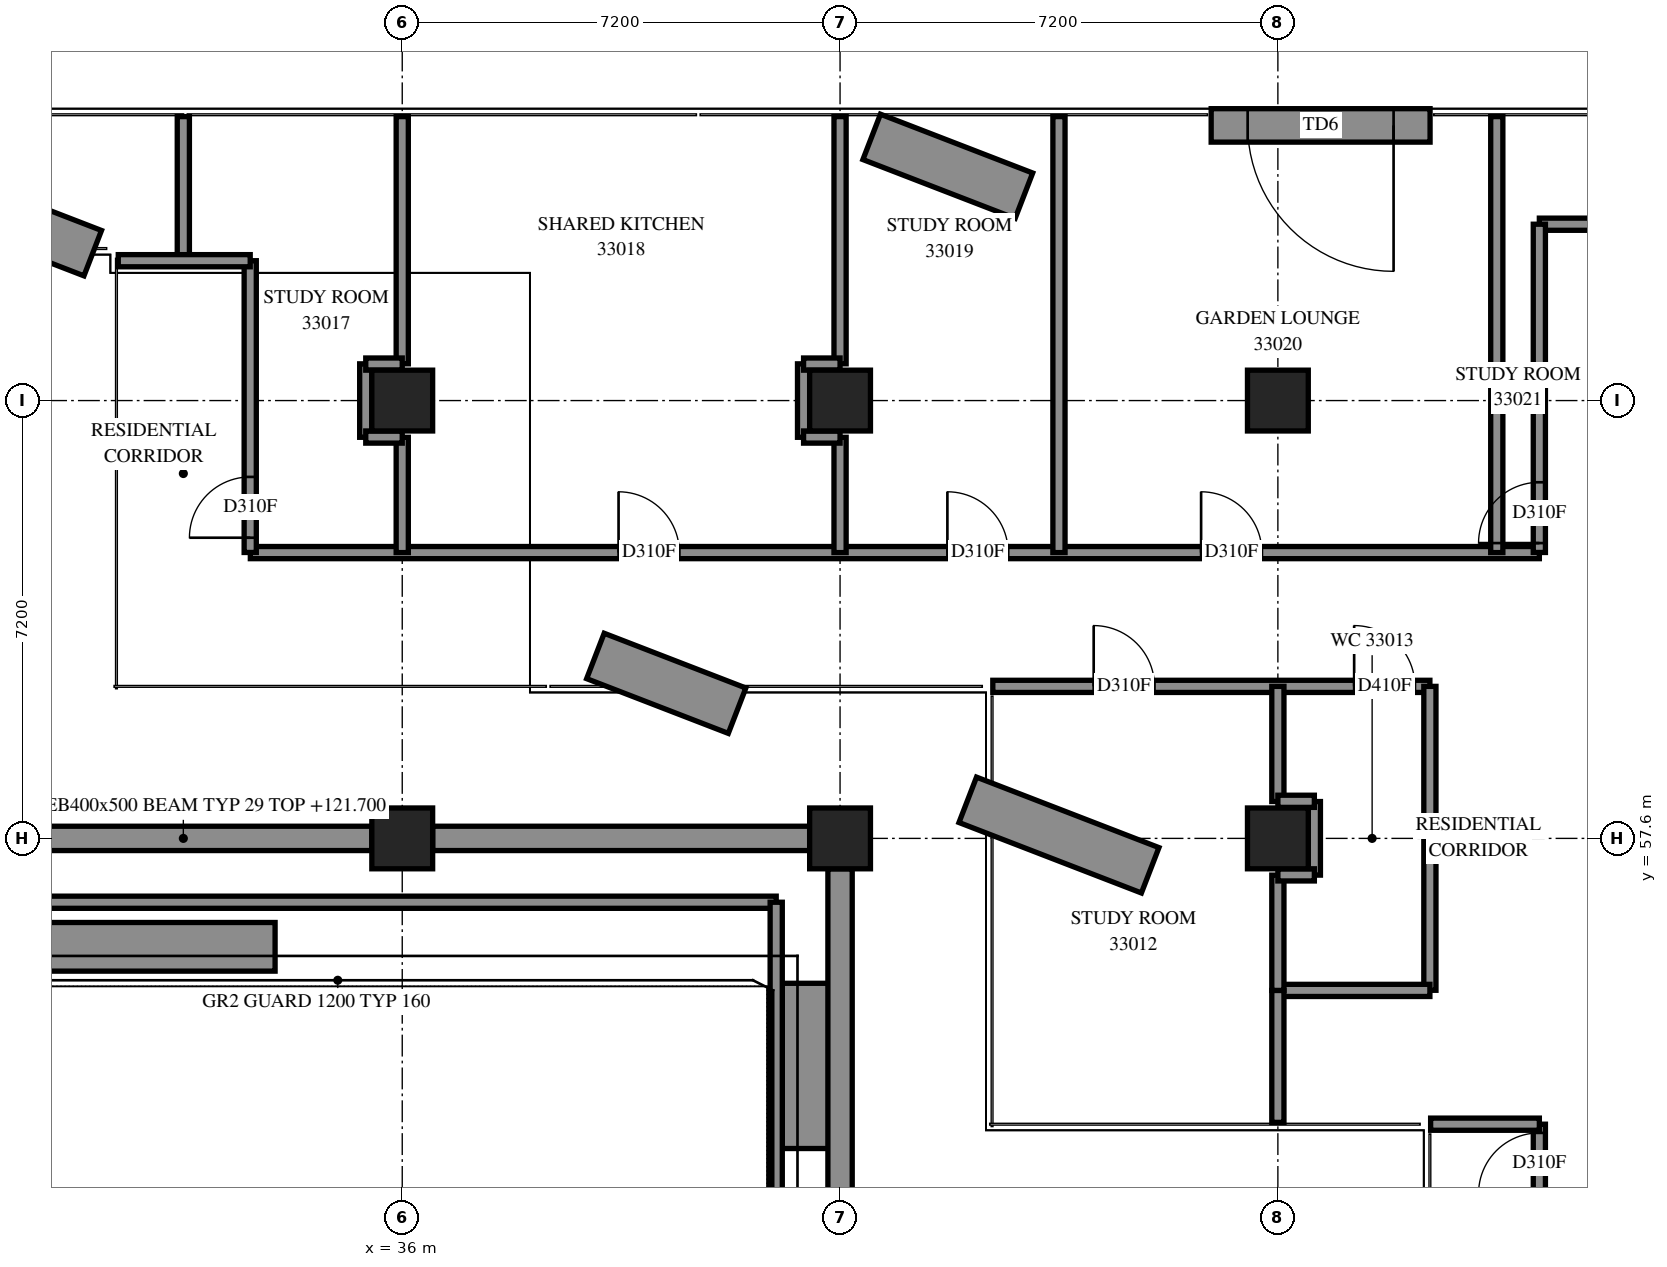
"""IFC4 building model, lengths in metres.
Left out: names, types, materials, properties, quantities, classifications, styles, units other than length and angle.
Written with IfcOpenShell. Run it as: python <this file> out.ifc"""

import sys

from ifc_helpers import new_model, si_unit, direction, frame, frame_2d, origin, origin_2d, place, context, subcontext, project, spatial, polyline, rectangle, outline, extrude, element, fill, save


model = new_model("IFC4")
c1 = context("Model", 3, precision=1e-05, world=origin(), true_north=direction((0.0, 1.0)))
c2 = subcontext(c1, "Body", "Model", "MODEL_VIEW")
j1 = project(units=[si_unit("LENGTHUNIT", "METRE"), si_unit("PLANEANGLEUNIT", "RADIAN")], contexts=[c1])
p1 = place(None, origin())
s1 = spatial("IfcSite", under=j1, at=p1, CompositionType="ELEMENT")
p2 = place(p1, origin())
s2 = spatial("IfcBuilding", under=s1, at=p2, CompositionType="ELEMENT")
p3 = place(p2, frame((0.0, 0.0, 122.0)))
s3 = spatial("IfcBuildingStorey", under=s2, at=p3, CompositionType="ELEMENT", Elevation=122.0)
for number, where, z_axis, x_axis in (
    (1, (36.0, 57.6, 0.0), (0.0, 0.0, 1.0), (1.0, 0.0, 0.0)),
    (2, (36.0, 64.8, 0.0), (0.0, 0.0, 1.0), (1.0, 0.0, 0.0)),
    (3, (43.2, 57.6, 0.0), (0.0, 0.0, 1.0), (1.0, 0.0, 0.0)),
    (4, (43.2, 64.8, 0.0), (0.0, 0.0, 1.0), (1.0, 0.0, 0.0)),
    (5, (50.4, 57.6, 0.0), (0.0, 0.0, 1.0), (1.0, 0.0, 0.0)),
    (6, (50.4, 64.8, 0.0), (0.0, 0.0, 1.0), (1.0, 0.0, 0.0)),
):
    element("IfcColumn", number, at=place(p3, frame(where, z_axis=z_axis, x_axis=x_axis)), inside=s3, PredefinedType="COLUMN", context=c2, shape_type="SweptSolid", body=[
        extrude(rectangle(XDim=1.0, YDim=1.0, at=origin_2d()), origin(), (0.0, 0.0, 1.0), 3.9),
    ])
p4 = place(p3, frame((52.903, 69.325, 0.0), z_axis=(0.0, 0.0, 1.0), x_axis=(-1.0, 0.0, 0.0)))
e7 = element("IfcWall", 7, at=p4, inside=s3, PredefinedType="SOLIDWALL", context=c2, shape_type="SweptSolid", body=[
    extrude(rectangle(XDim=3.6, YDim=0.55, at=frame_2d((1.8, 0.0))), origin(), (0.0, 0.0, 1.0), 3.9),
])
p5 = place(p4, frame((0.6, 0.0, 0.0)))
e8 = element("IfcOpeningElement", 8, at=p5, cuts=e7, PredefinedType="OPENING", context=c2, shape_type="SweptSolid", body=[
    extrude(rectangle(XDim=2.4, YDim=2.4, at=frame_2d((1.2, 1.2))), frame((0.0, 0.285, 0.0), z_axis=(0.0, -1.0, 0.0), x_axis=(1.0, 0.0, 0.0)), (0.0, 0.0, 1.0), 0.57),
])
p6 = place(p3, frame((28.85, 55.817, 0.0), z_axis=(0.0, 0.0, 1.0), x_axis=(1.0, 0.0, 0.0)))
e9 = element("IfcWall", 9, at=p6, inside=s3, PredefinedType="SOLIDWALL", context=c2, shape_type="SweptSolid", body=[
    extrude(rectangle(XDim=5.059, YDim=0.8, at=frame_2d((2.53, 0.0))), origin(), (0.0, 0.0, 1.0), 0.65),
])
p7 = place(p3, frame((42.65, 55.217, 0.0), z_axis=(0.0, 0.0, 1.0), x_axis=(0.0, -1.0, 0.0)))
e10 = element("IfcWall", 10, at=p7, inside=s3, PredefinedType="SOLIDWALL", context=c2, shape_type="SweptSolid", body=[
    extrude(rectangle(XDim=2.717, YDim=0.8, at=frame_2d((1.359, 0.0))), origin(), (0.0, 0.0, 1.0), 0.65),
])
p8 = place(p3, frame((46.224, 68.169, 0.0), z_axis=(0.0, 0.0, 1.0), x_axis=(-0.9328058207, 0.3603793848, 0.0)))
e11 = element("IfcWall", 11, at=p8, inside=s3, PredefinedType="SOLIDWALL", context=c2, shape_type="SweptSolid", body=[
    extrude(rectangle(XDim=2.684, YDim=0.8, at=frame_2d((1.342, 0.0))), origin(), (0.0, 0.0, 1.0), 0.65),
])
p9 = place(p3, frame((30.91, 67.224, 0.0), z_axis=(0.0, 0.0, 1.0), x_axis=(-0.9328062354, 0.3603783111, 0.0)))
e12 = element("IfcWall", 12, at=p9, inside=s3, PredefinedType="SOLIDWALL", context=c2, shape_type="SweptSolid", body=[
    extrude(rectangle(XDim=7.828, YDim=0.8, at=frame_2d((3.914, 0.0))), origin(), (0.0, 0.0, 1.0), 0.65),
])
p10 = place(p3, frame((48.3, 57.075, 0.0), z_axis=(0.0, 0.0, 1.0), x_axis=(-0.932818089, 0.3603476278, 0.0)))
e13 = element("IfcWall", 13, at=p10, inside=s3, PredefinedType="SOLIDWALL", context=c2, shape_type="SweptSolid", body=[
    extrude(rectangle(XDim=3.216, YDim=0.8, at=frame_2d((1.608, 0.0))), origin(), (0.0, 0.0, 1.0), 0.65),
])
p11 = place(p3, frame((27.75, 56.55, 0.0), z_axis=(0.0, 0.0, 1.0), x_axis=(1.0, 0.0, 0.0)))
e14 = element("IfcWall", 14, at=p11, inside=s3, PredefinedType="SOLIDWALL", context=c2, shape_type="SweptSolid", body=[
    extrude(outline(polyline([(-0.1, -0.1), (14.3, -0.1), (14.5, 0.1), (0.1, 0.1), (-0.1, -0.1)])), origin(), (0.0, 0.0, 1.0), 4.2),
])
p12 = place(p3, frame((42.15, 56.55, 0.0), z_axis=(0.0, 0.0, 1.0), x_axis=(0.0, -1.0, 0.0)))
e15 = element("IfcWall", 15, at=p12, inside=s3, PredefinedType="SOLIDWALL", context=c2, shape_type="SweptSolid", body=[
    extrude(outline(polyline([(0.1, -0.1), (7.3, -0.1), (7.1, 0.1), (-0.1, 0.1), (0.1, -0.1)])), origin(), (0.0, 0.0, 1.0), 4.2),
])
p13 = place(p3, frame((33.502, 62.3, 0.0), z_axis=(0.0, 0.0, 1.0), x_axis=(1.0, 0.0, 0.0)))
e16 = element("IfcWall", 16, at=p13, inside=s3, PredefinedType="PARTITIONING", context=c2, shape_type="SweptSolid", body=[
    extrude(rectangle(XDim=21.198, YDim=0.2, at=frame_2d((10.599, 0.0))), origin(), (0.0, 0.0, 1.0), 3.9),
])
p14 = place(p13, frame((6.056, 0.0, 0.0)))
e17 = element("IfcOpeningElement", 17, at=p14, cuts=e16, PredefinedType="OPENING", context=c2, shape_type="SweptSolid", body=[
    extrude(rectangle(XDim=1.0, YDim=2.1, at=frame_2d((0.5, 1.05))), frame((0.0, 0.11, 0.0), z_axis=(0.0, -1.0, 0.0), x_axis=(1.0, 0.0, 0.0)), (0.0, 0.0, 1.0), 0.22),
])
p15 = place(p13, frame((11.463, 0.0, 0.0)))
e18 = element("IfcOpeningElement", 18, at=p15, cuts=e16, PredefinedType="OPENING", context=c2, shape_type="SweptSolid", body=[
    extrude(rectangle(XDim=1.0, YDim=2.1, at=frame_2d((0.5, 1.05))), frame((0.0, 0.11, 0.0), z_axis=(0.0, -1.0, 0.0), x_axis=(1.0, 0.0, 0.0)), (0.0, 0.0, 1.0), 0.22),
])
p16 = place(p13, frame((15.636, 0.0, 0.0)))
e19 = element("IfcOpeningElement", 19, at=p16, cuts=e16, PredefinedType="OPENING", context=c2, shape_type="SweptSolid", body=[
    extrude(rectangle(XDim=1.0, YDim=2.1, at=frame_2d((0.5, 1.05))), frame((0.0, 0.11, 0.0), z_axis=(0.0, -1.0, 0.0), x_axis=(1.0, 0.0, 0.0)), (0.0, 0.0, 1.0), 0.22),
])
p17 = place(p3, frame((54.7, 67.7, 0.0), z_axis=(0.0, 0.0, 1.0), x_axis=(1.0, 0.0, 0.0)))
e20 = element("IfcWall", 20, at=p17, inside=s3, PredefinedType="PARTITIONING", context=c2, shape_type="SweptSolid", body=[
    extrude(rectangle(XDim=20.2, YDim=0.2, at=frame_2d((10.1, 0.0))), origin(), (0.0, 0.0, 1.0), 3.9),
])
p18 = place(p17, frame((8.838, 0.0, 0.0)))
e21 = element("IfcOpeningElement", 21, at=p18, cuts=e20, PredefinedType="OPENING", context=c2, shape_type="SweptSolid", body=[
    extrude(rectangle(XDim=1.0, YDim=2.1, at=frame_2d((0.5, 1.05))), frame((0.0, 0.11, 0.0), z_axis=(0.0, -1.0, 0.0), x_axis=(1.0, 0.0, 0.0)), (0.0, 0.0, 1.0), 0.22),
])
p19 = place(p3, frame((45.712, 60.1, 0.0), z_axis=(0.0, 0.0, 1.0), x_axis=(1.0, 0.0, 0.0)))
e22 = element("IfcWall", 22, at=p19, inside=s3, PredefinedType="PARTITIONING", context=c2, shape_type="SweptSolid", body=[
    extrude(rectangle(XDim=7.188, YDim=0.2, at=frame_2d((3.594, 0.0))), origin(), (0.0, 0.0, 1.0), 3.9),
])
p20 = place(p19, frame((1.659, 0.0, 0.0)))
e23 = element("IfcOpeningElement", 23, at=p20, cuts=e22, PredefinedType="OPENING", context=c2, shape_type="SweptSolid", body=[
    extrude(rectangle(XDim=1.0, YDim=2.1, at=frame_2d((0.5, 1.05))), frame((0.0, 0.11, 0.0), z_axis=(0.0, -1.0, 0.0), x_axis=(1.0, 0.0, 0.0)), (0.0, 0.0, 1.0), 0.22),
])
p21 = place(p19, frame((5.942, 0.0, 0.0)))
e24 = element("IfcOpeningElement", 24, at=p21, cuts=e22, PredefinedType="OPENING", context=c2, shape_type="SweptSolid", body=[
    extrude(rectangle(XDim=1.0, YDim=2.1, at=frame_2d((0.5, 1.05))), frame((0.0, 0.11, 0.0), z_axis=(0.0, -1.0, 0.0), x_axis=(1.0, 0.0, 0.0)), (0.0, 0.0, 1.0), 0.22),
])
for number, where, z_axis, x_axis in (
    (25, (46.8, 62.3, 0.0), (0.0, 0.0, 1.0), (0.0, 1.0, 0.0)),
    (26, (54.0, 62.3, 0.0), (0.0, 0.0, 1.0), (0.0, 1.0, 0.0)),
):
    element("IfcWall", number, at=place(p3, frame(where, z_axis=z_axis, x_axis=x_axis)), inside=s3, PredefinedType="PARTITIONING", context=c2, shape_type="SweptSolid", body=[
        extrude(rectangle(XDim=7.17, YDim=0.2, at=frame_2d((3.585, 0.0))), origin(), (0.0, 0.0, 1.0), 3.9),
    ])
p22 = place(p3, frame((54.7, 47.5, 0.0), z_axis=(0.0, 0.0, 1.0), x_axis=(0.0, 1.0, 0.0)))
e27 = element("IfcWall", 27, at=p22, inside=s3, PredefinedType="PARTITIONING", context=c2, shape_type="SweptSolid", body=[
    extrude(rectangle(XDim=5.4, YDim=0.2, at=frame_2d((2.7, 0.0))), origin(), (0.0, 0.0, 1.0), 3.9),
])
p23 = place(p22, frame((4.257, 0.0, 0.0)))
e28 = element("IfcOpeningElement", 28, at=p23, cuts=e27, PredefinedType="OPENING", context=c2, shape_type="SweptSolid", body=[
    extrude(rectangle(XDim=1.0, YDim=2.1, at=frame_2d((0.5, 1.05))), frame((0.0, 0.11, 0.0), z_axis=(0.0, -1.0, 0.0), x_axis=(1.0, 0.0, 0.0)), (0.0, 0.0, 1.0), 0.22),
])
p24 = place(p3, frame((54.7, 62.302, 0.0), z_axis=(0.0, 0.0, 1.0), x_axis=(0.0, 1.0, 0.0)))
e29 = element("IfcWall", 29, at=p24, inside=s3, PredefinedType="PARTITIONING", context=c2, shape_type="SweptSolid", body=[
    extrude(rectangle(XDim=5.398, YDim=0.2, at=frame_2d((2.699, 0.0))), origin(), (0.0, 0.0, 1.0), 3.9),
])
p25 = place(p24, frame((0.154, 0.0, 0.0)))
e30 = element("IfcOpeningElement", 30, at=p25, cuts=e29, PredefinedType="OPENING", context=c2, shape_type="SweptSolid", body=[
    extrude(rectangle(XDim=1.0, YDim=2.1, at=frame_2d((0.5, 1.05))), frame((0.0, 0.11, 0.0), z_axis=(0.0, -1.0, 0.0), x_axis=(1.0, 0.0, 0.0)), (0.0, 0.0, 1.0), 0.22),
])
p26 = place(p3, frame((52.9, 55.102, 0.0), z_axis=(0.0, 0.0, 1.0), x_axis=(0.0, 1.0, 0.0)))
e31 = element("IfcWall", 31, at=p26, inside=s3, PredefinedType="PARTITIONING", context=c2, shape_type="SweptSolid", body=[
    extrude(rectangle(XDim=4.998, YDim=0.2, at=frame_2d((2.499, 0.0))), origin(), (0.0, 0.0, 1.0), 3.9),
])
p27 = place(p3, frame((33.5, 62.302, 0.0), z_axis=(0.0, 0.0, 1.0), x_axis=(0.0, 1.0, 0.0)))
e32 = element("IfcWall", 32, at=p27, inside=s3, PredefinedType="PARTITIONING", context=c2, shape_type="SweptSolid", body=[
    extrude(rectangle(XDim=4.798, YDim=0.2, at=frame_2d((2.399, 0.0))), origin(), (0.0, 0.0, 1.0), 3.9),
])
p28 = place(p27, frame((0.242, 0.0, 0.0)))
e33 = element("IfcOpeningElement", 33, at=p28, cuts=e32, PredefinedType="OPENING", context=c2, shape_type="SweptSolid", body=[
    extrude(rectangle(XDim=1.0, YDim=2.1, at=frame_2d((0.5, 1.05))), frame((0.0, 0.11, 0.0), z_axis=(0.0, -1.0, 0.0), x_axis=(1.0, 0.0, 0.0)), (0.0, 0.0, 1.0), 0.22),
])
for number, where, z_axis, x_axis in (
    (34, (36.0, 65.404, 0.0), (0.0, 0.0, 1.0), (0.0, 1.0, 0.0)),
    (35, (43.2, 65.404, 0.0), (0.0, 0.0, 1.0), (0.0, 1.0, 0.0)),
):
    element("IfcWall", number, at=place(p3, frame(where, z_axis=z_axis, x_axis=x_axis)), inside=s3, PredefinedType="PARTITIONING", context=c2, shape_type="SweptSolid", body=[
        extrude(rectangle(XDim=4.066, YDim=0.2, at=frame_2d((2.033, 0.0))), origin(), (0.0, 0.0, 1.0), 3.9),
    ])
p29 = place(p3, frame((50.4, 55.1, 0.0), z_axis=(0.0, 0.0, 1.0), x_axis=(1.0, 0.0, 0.0)))
e36 = element("IfcWall", 36, at=p29, inside=s3, PredefinedType="PARTITIONING", context=c2, shape_type="SweptSolid", body=[
    extrude(rectangle(XDim=2.5, YDim=0.2, at=frame_2d((1.25, 0.0))), origin(), (0.0, 0.0, 1.0), 3.9),
])
p30 = place(p3, frame((32.4, 67.1, 0.0), z_axis=(0.0, 0.0, 1.0), x_axis=(0.0, 1.0, 0.0)))
e37 = element("IfcWall", 37, at=p30, inside=s3, PredefinedType="PARTITIONING", context=c2, shape_type="SweptSolid", body=[
    extrude(rectangle(XDim=2.37, YDim=0.2, at=frame_2d((1.185, 0.0))), origin(), (0.0, 0.0, 1.0), 3.9),
])
for number, where, z_axis, x_axis in (
    (38, (31.33, 67.1, 0.0), (0.0, 0.0, 1.0), (1.0, 0.0, 0.0)),
    (39, (50.4, 52.93, 0.0), (0.0, 0.0, 1.0), (0.0, 1.0, 0.0)),
):
    element("IfcWall", number, at=place(p3, frame(where, z_axis=z_axis, x_axis=x_axis)), inside=s3, PredefinedType="PARTITIONING", context=c2, shape_type="SweptSolid", body=[
        extrude(rectangle(XDim=2.17, YDim=0.2, at=frame_2d((1.085, 0.0))), origin(), (0.0, 0.0, 1.0), 3.9),
    ])
for number, where, z_axis, x_axis in (
    (40, (36.0, 62.3, 0.0), (0.0, 0.0, 1.0), (0.0, 1.0, 0.0)),
    (41, (43.2, 62.3, 0.0), (0.0, 0.0, 1.0), (0.0, 1.0, 0.0)),
    (42, (50.4, 55.1, 0.0), (0.0, 0.0, 1.0), (0.0, 1.0, 0.0)),
):
    element("IfcWall", number, at=place(p3, frame(where, z_axis=z_axis, x_axis=x_axis)), inside=s3, PredefinedType="PARTITIONING", context=c2, shape_type="SweptSolid", body=[
        extrude(rectangle(XDim=1.896, YDim=0.2, at=frame_2d((0.948, 0.0))), origin(), (0.0, 0.0, 1.0), 3.9),
    ])
p31 = place(p3, frame((50.4, 58.206, 0.0), z_axis=(0.0, 0.0, 1.0), x_axis=(0.0, 1.0, 0.0)))
e43 = element("IfcWall", 43, at=p31, inside=s3, PredefinedType="PARTITIONING", context=c2, shape_type="SweptSolid", body=[
    extrude(rectangle(XDim=1.894, YDim=0.2, at=frame_2d((0.947, 0.0))), origin(), (0.0, 0.0, 1.0), 3.9),
])
p32 = place(p3, frame((52.912, 52.9, 0.0), z_axis=(0.0, 0.0, 1.0), x_axis=(1.0, 0.0, 0.0)))
e44 = element("IfcWall", 44, at=p32, inside=s3, PredefinedType="PARTITIONING", context=c2, shape_type="SweptSolid", body=[
    extrude(rectangle(XDim=1.788, YDim=0.2, at=frame_2d((0.894, 0.0))), origin(), (0.0, 0.0, 1.0), 3.9),
])
p33 = place(p3, frame((51.0, 56.996, 0.0), z_axis=(0.0, 0.0, 1.0), x_axis=(0.0, 1.0, 0.0)))
e45 = element("IfcWall", 45, at=p33, inside=s3, PredefinedType="PARTITIONING", context=c2, shape_type="SweptSolid", body=[
    extrude(rectangle(XDim=1.21, YDim=0.2, at=frame_2d((0.605, 0.0))), origin(), (0.0, 0.0, 1.0), 3.9),
])
for number, where, z_axis, x_axis in (
    (46, (35.4, 64.196, 0.0), (0.0, 0.0, 1.0), (0.0, 1.0, 0.0)),
    (47, (42.6, 64.196, 0.0), (0.0, 0.0, 1.0), (0.0, 1.0, 0.0)),
):
    element("IfcWall", number, at=place(p3, frame(where, z_axis=z_axis, x_axis=x_axis)), inside=s3, PredefinedType="PARTITIONING", context=c2, shape_type="SweptSolid", body=[
        extrude(rectangle(XDim=1.208, YDim=0.2, at=frame_2d((0.604, 0.0))), origin(), (0.0, 0.0, 1.0), 3.9),
    ])
for number, where, z_axis, x_axis in (
    (48, (35.4, 65.4, 0.0), (0.0, 0.0, 1.0), (1.0, 0.0, 0.0)),
    (49, (42.6, 65.4, 0.0), (0.0, 0.0, 1.0), (1.0, 0.0, 0.0)),
    (50, (35.4, 64.2, 0.0), (0.0, 0.0, 1.0), (1.0, 0.0, 0.0)),
    (51, (42.6, 64.2, 0.0), (0.0, 0.0, 1.0), (1.0, 0.0, 0.0)),
    (52, (50.4, 58.21, 0.0), (0.0, 0.0, 1.0), (1.0, 0.0, 0.0)),
    (53, (50.4, 57.0, 0.0), (0.0, 0.0, 1.0), (1.0, 0.0, 0.0)),
):
    element("IfcWall", number, at=place(p3, frame(where, z_axis=z_axis, x_axis=x_axis)), inside=s3, PredefinedType="PARTITIONING", context=c2, shape_type="SweptSolid", body=[
        extrude(rectangle(XDim=0.6, YDim=0.2, at=frame_2d((0.3, 0.0))), origin(), (0.0, 0.0, 1.0), 3.9),
    ])
p34 = place(p3, frame((41.507, 59.7, 0.0), z_axis=(0.0, 0.0, 1.0), x_axis=(-0.9328131239, 0.3603604805, 0.0)))
e54 = element("IfcWall", 54, at=p34, inside=s3, PredefinedType="SOLIDWALL", context=c2, shape_type="SweptSolid", body=[
    extrude(outline(polyline([(0.0, -0.4), (2.498, -0.4), (2.498, 0.4), (0.0, 0.4), (0.0, -0.4)])), origin(), (0.0, 0.0, 1.0), 0.65),
])
p35 = place(p5, origin())
e55 = element("IfcDoor", 55, at=p35, inside=s3, OperationType="SINGLE_SWING_LEFT", PredefinedType="DOOR", context=c2, shape_type="SweptSolid", body=[
    extrude(rectangle(XDim=2.4, YDim=2.4, at=frame_2d((1.2, 1.2))), frame((0.0, 0.025, 0.0), z_axis=(0.0, -1.0, 0.0), x_axis=(1.0, 0.0, 0.0)), (0.0, 0.0, 1.0), 0.05),
])
fill(e8, e55)
p36 = place(p20, origin())
e56 = element("IfcDoor", 56, at=p36, inside=s3, OperationType="SINGLE_SWING_LEFT", PredefinedType="DOOR", context=c2, shape_type="SweptSolid", body=[
    extrude(rectangle(XDim=1.0, YDim=2.1, at=frame_2d((0.5, 1.05))), frame((0.0, 0.025, 0.0), z_axis=(0.0, -1.0, 0.0), x_axis=(1.0, 0.0, 0.0)), (0.0, 0.0, 1.0), 0.05),
])
fill(e23, e56)
p37 = place(p21, origin())
e57 = element("IfcDoor", 57, at=p37, inside=s3, OperationType="SINGLE_SWING_LEFT", PredefinedType="DOOR", context=c2, shape_type="SweptSolid", body=[
    extrude(rectangle(XDim=1.0, YDim=2.1, at=frame_2d((0.5, 1.05))), frame((0.0, 0.025, 0.0), z_axis=(0.0, -1.0, 0.0), x_axis=(1.0, 0.0, 0.0)), (0.0, 0.0, 1.0), 0.05),
])
fill(e24, e57)
p38 = place(p23, origin())
e58 = element("IfcDoor", 58, at=p38, inside=s3, OperationType="SINGLE_SWING_LEFT", PredefinedType="DOOR", context=c2, shape_type="SweptSolid", body=[
    extrude(rectangle(XDim=1.0, YDim=2.1, at=frame_2d((0.5, 1.05))), frame((0.0, 0.025, 0.0), z_axis=(0.0, -1.0, 0.0), x_axis=(1.0, 0.0, 0.0)), (0.0, 0.0, 1.0), 0.05),
])
fill(e28, e58)
p39 = place(p28, origin())
e59 = element("IfcDoor", 59, at=p39, inside=s3, OperationType="SINGLE_SWING_LEFT", PredefinedType="DOOR", context=c2, shape_type="SweptSolid", body=[
    extrude(rectangle(XDim=1.0, YDim=2.1, at=frame_2d((0.5, 1.05))), frame((0.0, 0.025, 0.0), z_axis=(0.0, -1.0, 0.0), x_axis=(1.0, 0.0, 0.0)), (0.0, 0.0, 1.0), 0.05),
])
fill(e33, e59)
p40 = place(p14, origin())
e60 = element("IfcDoor", 60, at=p40, inside=s3, OperationType="SINGLE_SWING_RIGHT", PredefinedType="DOOR", context=c2, shape_type="SweptSolid", body=[
    extrude(rectangle(XDim=1.0, YDim=2.1, at=frame_2d((0.5, 1.05))), frame((0.0, 0.025, 0.0), z_axis=(0.0, -1.0, 0.0), x_axis=(1.0, 0.0, 0.0)), (0.0, 0.0, 1.0), 0.05),
])
fill(e17, e60)
p41 = place(p15, origin())
e61 = element("IfcDoor", 61, at=p41, inside=s3, OperationType="SINGLE_SWING_RIGHT", PredefinedType="DOOR", context=c2, shape_type="SweptSolid", body=[
    extrude(rectangle(XDim=1.0, YDim=2.1, at=frame_2d((0.5, 1.05))), frame((0.0, 0.025, 0.0), z_axis=(0.0, -1.0, 0.0), x_axis=(1.0, 0.0, 0.0)), (0.0, 0.0, 1.0), 0.05),
])
fill(e18, e61)
p42 = place(p16, origin())
e62 = element("IfcDoor", 62, at=p42, inside=s3, OperationType="SINGLE_SWING_LEFT", PredefinedType="DOOR", context=c2, shape_type="SweptSolid", body=[
    extrude(rectangle(XDim=1.0, YDim=2.1, at=frame_2d((0.5, 1.05))), frame((0.0, 0.025, 0.0), z_axis=(0.0, -1.0, 0.0), x_axis=(1.0, 0.0, 0.0)), (0.0, 0.0, 1.0), 0.05),
])
fill(e19, e62)
p43 = place(p25, origin())
e63 = element("IfcDoor", 63, at=p43, inside=s3, OperationType="SINGLE_SWING_LEFT", PredefinedType="DOOR", context=c2, shape_type="SweptSolid", body=[
    extrude(rectangle(XDim=1.0, YDim=2.1, at=frame_2d((0.5, 1.05))), frame((0.0, 0.025, 0.0), z_axis=(0.0, -1.0, 0.0), x_axis=(1.0, 0.0, 0.0)), (0.0, 0.0, 1.0), 0.05),
])
fill(e30, e63)
save(model, sys.argv[1])
